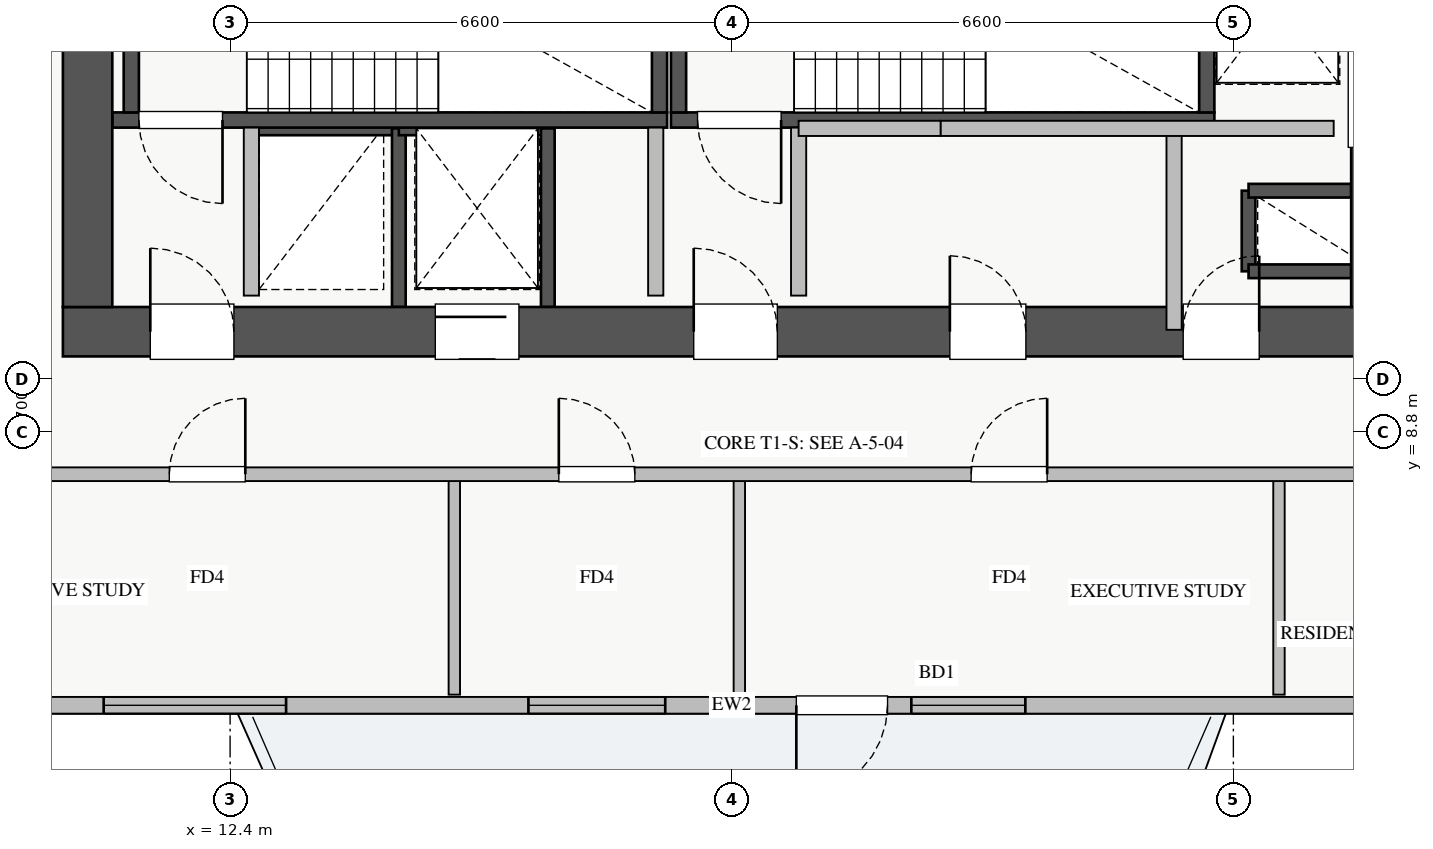
"""IFC4 building model, lengths in metres.
Left out: names, types, materials, properties, quantities, classifications, styles, units other than length and angle.
Written with IfcOpenShell. Run it as: python <this file> out.ifc"""

import sys

from ifc_helpers import new_model, si_unit, direction, frame, frame_2d, origin, place, context, subcontext, project, spatial, rectangle, extrude, source, transform, mapped, element, fill, save


model = new_model("IFC4")
c1 = context("Model", 3, precision=1e-05, world=origin(), true_north=direction((0.0, 1.0)))
c2 = subcontext(c1, "Body", "Model", "MODEL_VIEW")
j1 = project(units=[si_unit("LENGTHUNIT", "METRE"), si_unit("PLANEANGLEUNIT", "RADIAN")], contexts=[c1])
p1 = place(None, origin())
s1 = spatial("IfcSite", under=j1, at=p1, CompositionType="ELEMENT")
p2 = place(p1, origin())
s2 = spatial("IfcBuilding", under=s1, at=p2, CompositionType="ELEMENT")
p3 = place(p2, frame((0.0, 0.0, 116.5)))
s3 = spatial("IfcBuildingStorey", under=s2, at=p3, CompositionType="ELEMENT", Elevation=116.5)
p4 = place(p3, frame((12.68, 12.8, 0.0), z_axis=(0.0, 0.0, 1.0), x_axis=(1.0, 0.0, 0.0)))
e1 = element("IfcWall", 1, at=p4, inside=s3, PredefinedType="SHEAR", context=c2, shape_type="SweptSolid", body=[
    extrude(rectangle(XDim=1.94, YDim=0.18, at=frame_2d((0.97, 0.0))), origin(), (0.0, 0.0, 1.0), 3.07),
])
p5 = place(p3, frame((14.62, 10.45, 0.0), z_axis=(0.0, 0.0, 1.0), x_axis=(0.0, 1.0, 0.0)))
e2 = element("IfcWall", 2, at=p5, inside=s3, PredefinedType="SHEAR", context=c2, shape_type="SweptSolid", body=[
    extrude(rectangle(XDim=2.35, YDim=0.18, at=frame_2d((1.175, 0.0))), origin(), (0.0, 0.0, 1.0), 3.07),
])
p6 = place(p3, frame((25.8, 10.92, 0.0), z_axis=(0.0, 0.0, 1.0), x_axis=(0.0, 1.0, 0.0)))
e3 = element("IfcWall", 3, at=p6, inside=s3, PredefinedType="SHEAR", context=c2, shape_type="SweptSolid", body=[
    extrude(rectangle(XDim=1.06, YDim=0.18, at=frame_2d((0.53, 0.0))), origin(), (0.0, 0.0, 1.0), 3.07),
])
for number, where, z_axis, x_axis in (
    (4, (25.8, 11.98, 0.0), (0.0, 0.0, 1.0), (1.0, 0.0, 0.0)),
    (5, (25.8, 10.92, 0.0), (0.0, 0.0, 1.0), (1.0, 0.0, 0.0)),
):
    element("IfcWall", number, at=place(p3, frame(where, z_axis=z_axis, x_axis=x_axis)), inside=s3, PredefinedType="SHEAR", context=c2, shape_type="SweptSolid", body=[
        extrude(rectangle(XDim=1.35, YDim=0.18, at=frame_2d((0.675, 0.0))), origin(), (0.0, 0.0, 1.0), 3.07),
    ])
p7 = place(p3, frame((14.62, 12.8, 0.0), z_axis=(0.0, 0.0, 1.0), x_axis=(1.0, 0.0, 0.0)))
e6 = element("IfcWall", 6, at=p7, inside=s3, PredefinedType="SHEAR", context=c2, shape_type="SweptSolid", body=[
    extrude(rectangle(XDim=1.96, YDim=0.18, at=frame_2d((0.98, 0.0))), origin(), (0.0, 0.0, 1.0), 3.07),
])
p8 = place(p3, frame((16.58, 10.45, 0.0), z_axis=(0.0, 0.0, 1.0), x_axis=(0.0, 1.0, 0.0)))
e7 = element("IfcWall", 7, at=p8, inside=s3, PredefinedType="SHEAR", context=c2, shape_type="SweptSolid", body=[
    extrude(rectangle(XDim=2.35, YDim=0.18, at=frame_2d((1.175, 0.0))), origin(), (0.0, 0.0, 1.0), 3.07),
])
p9 = place(p3, frame((10.85, 12.91, 0.0), z_axis=(0.0, 0.0, 1.0), x_axis=(1.0, 0.0, 0.0)))
e8 = element("IfcWall", 8, at=p9, inside=s3, PredefinedType="SHEAR", context=c2, shape_type="SweptSolid", body=[
    extrude(rectangle(XDim=7.3, YDim=0.2, at=frame_2d((3.65, 0.0))), origin(), (0.0, 0.0, 1.0), 3.25),
])
p10 = place(p9, frame((0.35, 0.0, 0.0)))
e9 = element("IfcOpeningElement", 9, at=p10, cuts=e8, PredefinedType="OPENING", context=c2, shape_type="SweptSolid", body=[
    extrude(rectangle(XDim=1.1, YDim=2.05, at=frame_2d((0.55, 1.025))), frame((0.0, 0.11, 0.0), z_axis=(0.0, -1.0, 0.0), x_axis=(1.0, 0.0, 0.0)), (0.0, 0.0, 1.0), 0.22),
])
for number, where, z_axis, x_axis in (
    (10, (11.1, 13.01, 0.0), (0.0, 0.0, 1.0), (0.0, 1.0, 0.0)),
    (11, (18.05, 13.01, 0.0), (0.0, 0.0, 1.0), (0.0, 1.0, 0.0)),
):
    element("IfcWall", number, at=place(p3, frame(where, z_axis=z_axis, x_axis=x_axis)), inside=s3, PredefinedType="SHEAR", context=c2, shape_type="SweptSolid", body=[
        extrude(rectangle(XDim=2.94, YDim=0.2, at=frame_2d((1.47, 0.0))), origin(), (0.0, 0.0, 1.0), 3.25),
    ])
p11 = place(p3, frame((18.2, 12.91, 0.0), z_axis=(0.0, 0.0, 1.0), x_axis=(1.0, 0.0, 0.0)))
e12 = element("IfcWall", 12, at=p11, inside=s3, PredefinedType="SHEAR", context=c2, shape_type="SweptSolid", body=[
    extrude(rectangle(XDim=7.15, YDim=0.2, at=frame_2d((3.575, 0.0))), origin(), (0.0, 0.0, 1.0), 3.25),
])
p12 = place(p11, frame((0.35, 0.0, 0.0)))
e13 = element("IfcOpeningElement", 13, at=p12, cuts=e12, PredefinedType="OPENING", context=c2, shape_type="SweptSolid", body=[
    extrude(rectangle(XDim=1.1, YDim=2.05, at=frame_2d((0.55, 1.025))), frame((0.0, 0.11, 0.0), z_axis=(0.0, -1.0, 0.0), x_axis=(1.0, 0.0, 0.0)), (0.0, 0.0, 1.0), 0.22),
])
for number, where, z_axis, x_axis in (
    (14, (18.3, 13.01, 0.0), (0.0, 0.0, 1.0), (0.0, 1.0, 0.0)),
    (15, (25.25, 13.01, 0.0), (0.0, 0.0, 1.0), (0.0, 1.0, 0.0)),
):
    element("IfcWall", number, at=place(p3, frame(where, z_axis=z_axis, x_axis=x_axis)), inside=s3, PredefinedType="SHEAR", context=c2, shape_type="SweptSolid", body=[
        extrude(rectangle(XDim=2.94, YDim=0.2, at=frame_2d((1.47, 0.0))), origin(), (0.0, 0.0, 1.0), 3.25),
    ])
p13 = place(p3, frame((10.2, 10.125, 0.0), z_axis=(0.0, 0.0, 1.0), x_axis=(1.0, 0.0, 0.0)))
e16 = element("IfcWall", 16, at=p13, inside=s3, PredefinedType="SHEAR", context=c2, shape_type="SweptSolid", body=[
    extrude(rectangle(XDim=17.6, YDim=0.65, at=frame_2d((8.8, 0.0))), origin(), (0.0, 0.0, 1.0), 3.25),
])
p14 = place(p13, frame((1.15, 0.0, 0.0)))
e17 = element("IfcOpeningElement", 17, at=p14, cuts=e16, PredefinedType="OPENING", context=c2, shape_type="SweptSolid", body=[
    extrude(rectangle(XDim=1.1, YDim=2.05, at=frame_2d((0.55, 1.025))), frame((0.0, 0.335, 0.0), z_axis=(0.0, -1.0, 0.0), x_axis=(1.0, 0.0, 0.0)), (0.0, 0.0, 1.0), 0.67),
])
p15 = place(p13, frame((8.3, 0.0, 0.0)))
e18 = element("IfcOpeningElement", 18, at=p15, cuts=e16, PredefinedType="OPENING", context=c2, shape_type="SweptSolid", body=[
    extrude(rectangle(XDim=1.1, YDim=2.05, at=frame_2d((0.55, 1.025))), frame((0.0, 0.335, 0.0), z_axis=(0.0, -1.0, 0.0), x_axis=(1.0, 0.0, 0.0)), (0.0, 0.0, 1.0), 0.67),
])
p16 = place(p13, frame((4.9, 0.0, 0.0)))
e19 = element("IfcOpeningElement", 19, at=p16, cuts=e16, PredefinedType="OPENING", context=c2, shape_type="SweptSolid", body=[
    extrude(rectangle(XDim=1.1, YDim=2.05, at=frame_2d((0.55, 1.025))), frame((0.0, 0.335, 0.0), z_axis=(0.0, -1.0, 0.0), x_axis=(1.0, 0.0, 0.0)), (0.0, 0.0, 1.0), 0.67),
])
p17 = place(p13, frame((14.74, 0.0, 0.0)))
e20 = element("IfcOpeningElement", 20, at=p17, cuts=e16, PredefinedType="OPENING", context=c2, shape_type="SweptSolid", body=[
    extrude(rectangle(XDim=1.0, YDim=2.05, at=frame_2d((0.5, 1.025))), frame((0.0, 0.335, 0.0), z_axis=(0.0, -1.0, 0.0), x_axis=(1.0, 0.0, 0.0)), (0.0, 0.0, 1.0), 0.67),
])
p18 = place(p13, frame((11.67, 0.0, 0.0)))
e21 = element("IfcOpeningElement", 21, at=p18, cuts=e16, PredefinedType="OPENING", context=c2, shape_type="SweptSolid", body=[
    extrude(rectangle(XDim=1.0, YDim=2.05, at=frame_2d((0.5, 1.025))), frame((0.0, 0.335, 0.0), z_axis=(0.0, -1.0, 0.0), x_axis=(1.0, 0.0, 0.0)), (0.0, 0.0, 1.0), 0.67),
])
p19 = place(p3, frame((10.525, 10.45, 0.0), z_axis=(0.0, 0.0, 1.0), x_axis=(0.0, 1.0, 0.0)))
e22 = element("IfcWall", 22, at=p19, inside=s3, PredefinedType="SHEAR", context=c2, shape_type="SweptSolid", body=[
    extrude(rectangle(XDim=5.9, YDim=0.65, at=frame_2d((2.95, 0.0))), origin(), (0.0, 0.0, 1.0), 3.25),
])
p20 = place(p3, frame((27.475, 10.45, 0.0), z_axis=(0.0, 0.0, 1.0), x_axis=(0.0, 1.0, 0.0)))
e23 = element("IfcWall", 23, at=p20, inside=s3, PredefinedType="SHEAR", context=c2, shape_type="SweptSolid", body=[
    extrude(rectangle(XDim=5.9, YDim=0.65, at=frame_2d((2.95, 0.0))), origin(), (0.0, 0.0, 1.0), 3.25),
])
p21 = place(p20, frame((2.1, 0.0, 0.0)))
e24 = element("IfcOpeningElement", 24, at=p21, cuts=e23, PredefinedType="OPENING", context=c2, shape_type="SweptSolid", body=[
    extrude(rectangle(XDim=1.3, YDim=2.05, at=frame_2d((0.65, 1.025))), frame((0.0, 0.335, 0.0), z_axis=(0.0, -1.0, 0.0), x_axis=(1.0, 0.0, 0.0)), (0.0, 0.0, 1.0), 0.67),
])
p22 = place(p3, frame((6.55, 5.21, 0.0), z_axis=(0.0, 0.0, 1.0), x_axis=(1.0, 0.0, 0.0)))
e25 = element("IfcWall", 25, at=p22, inside=s3, PredefinedType="STANDARD", context=c2, shape_type="SweptSolid", body=[
    extrude(rectangle(XDim=24.9, YDim=0.22, at=frame_2d((12.45, 0.0))), origin(), (0.0, 0.0, 1.0), 2.61),
])
p23 = place(p22, frame((13.3, 0.0, 0.0)))
e26 = element("IfcOpeningElement", 26, at=p23, cuts=e25, PredefinedType="OPENING", context=c2, shape_type="SweptSolid", body=[
    extrude(rectangle(XDim=1.2, YDim=2.1, at=frame_2d((0.6, 1.05))), frame((0.0, 0.12, 0.0), z_axis=(0.0, -1.0, 0.0), x_axis=(1.0, 0.0, 0.0)), (0.0, 0.0, 1.0), 0.24),
])
p24 = place(p22, frame((0.258, 0.0, 0.9)))
e27 = element("IfcOpeningElement", 27, at=p24, cuts=e25, PredefinedType="OPENING", context=c2, shape_type="SweptSolid", body=[
    extrude(rectangle(XDim=1.8, YDim=1.5, at=frame_2d((0.9, 0.75))), frame((0.0, 0.12, 0.0), z_axis=(0.0, -1.0, 0.0), x_axis=(1.0, 0.0, 0.0)), (0.0, 0.0, 1.0), 0.24),
])
p25 = place(p22, frame((9.775, 0.0, 0.9)))
e28 = element("IfcOpeningElement", 28, at=p25, cuts=e25, PredefinedType="OPENING", context=c2, shape_type="SweptSolid", body=[
    extrude(rectangle(XDim=1.8, YDim=1.5, at=frame_2d((0.9, 0.75))), frame((0.0, 0.12, 0.0), z_axis=(0.0, -1.0, 0.0), x_axis=(1.0, 0.0, 0.0)), (0.0, 0.0, 1.0), 0.24),
])
p26 = place(p22, frame((14.813, 0.0, 0.9)))
e29 = element("IfcOpeningElement", 29, at=p26, cuts=e25, PredefinedType="OPENING", context=c2, shape_type="SweptSolid", body=[
    extrude(rectangle(XDim=1.5, YDim=1.45, at=frame_2d((0.75, 0.725))), frame((0.0, 0.12, 0.0), z_axis=(0.0, -1.0, 0.0), x_axis=(1.0, 0.0, 0.0)), (0.0, 0.0, 1.0), 0.24),
])
p27 = place(p22, frame((20.738, 0.0, 0.9)))
e30 = element("IfcOpeningElement", 30, at=p27, cuts=e25, PredefinedType="OPENING", context=c2, shape_type="SweptSolid", body=[
    extrude(rectangle(XDim=2.1, YDim=1.48, at=frame_2d((1.05, 0.74))), frame((0.0, 0.12, 0.0), z_axis=(0.0, -1.0, 0.0), x_axis=(1.0, 0.0, 0.0)), (0.0, 0.0, 1.0), 0.24),
])
p28 = place(p22, frame((4.187, 0.0, 0.9)))
e31 = element("IfcOpeningElement", 31, at=p28, cuts=e25, PredefinedType="OPENING", context=c2, shape_type="SweptSolid", body=[
    extrude(rectangle(XDim=2.4, YDim=1.5, at=frame_2d((1.2, 0.75))), frame((0.0, 0.12, 0.0), z_axis=(0.0, -1.0, 0.0), x_axis=(1.0, 0.0, 0.0)), (0.0, 0.0, 1.0), 0.24),
])
for number, where, z_axis, x_axis in (
    (32, (12.68, 10.6, 0.0), (0.0, 0.0, 1.0), (0.0, 1.0, 0.0)),
    (33, (18.0, 10.6, 0.0), (0.0, 0.0, 1.0), (0.0, 1.0, 0.0)),
    (34, (19.88, 10.6, 0.0), (0.0, 0.0, 1.0), (0.0, 1.0, 0.0)),
):
    element("IfcWall", number, at=place(p3, frame(where, z_axis=z_axis, x_axis=x_axis)), inside=s3, PredefinedType="PARTITIONING", context=c2, shape_type="SweptSolid", body=[
        extrude(rectangle(XDim=2.21, YDim=0.2, at=frame_2d((1.105, 0.0))), origin(), (0.0, 0.0, 1.0), 3.07),
    ])
p29 = place(p3, frame((24.82, 10.15, 0.0), z_axis=(0.0, 0.0, 1.0), x_axis=(0.0, 1.0, 0.0)))
e35 = element("IfcWall", 35, at=p29, inside=s3, PredefinedType="PARTITIONING", context=c2, shape_type="SweptSolid", body=[
    extrude(rectangle(XDim=2.65, YDim=0.2, at=frame_2d((1.325, 0.0))), origin(), (0.0, 0.0, 1.0), 3.07),
])
p30 = place(p3, frame((19.88, 12.8, 0.0), z_axis=(0.0, 0.0, 1.0), x_axis=(1.0, 0.0, 0.0)))
e36 = element("IfcWall", 36, at=p30, inside=s3, PredefinedType="PARTITIONING", context=c2, shape_type="SweptSolid", body=[
    extrude(rectangle(XDim=1.87, YDim=0.2, at=frame_2d((0.935, 0.0))), origin(), (0.0, 0.0, 1.0), 3.07),
])
p31 = place(p3, frame((21.75, 12.8, 0.0), z_axis=(0.0, 0.0, 1.0), x_axis=(1.0, 0.0, 0.0)))
e37 = element("IfcWall", 37, at=p31, inside=s3, PredefinedType="PARTITIONING", context=c2, shape_type="SweptSolid", body=[
    extrude(rectangle(XDim=5.17, YDim=0.2, at=frame_2d((2.585, 0.0))), origin(), (0.0, 0.0, 1.0), 3.07),
])
p32 = place(p3, frame((15.35, 5.35, 0.0), z_axis=(0.0, 0.0, 1.0), x_axis=(0.0, 1.0, 0.0)))
e38 = element("IfcWall", 38, at=p32, inside=s3, PredefinedType="PARTITIONING", context=c2, shape_type="SweptSolid", body=[
    extrude(rectangle(XDim=2.9, YDim=0.15, at=frame_2d((1.45, 0.0))), origin(), (0.0, 0.0, 1.0), 3.07),
])
p33 = place(p3, frame((19.1, 5.35, 0.0), z_axis=(0.0, 0.0, 1.0), x_axis=(0.0, 1.0, 0.0)))
e39 = element("IfcWall", 39, at=p33, inside=s3, PredefinedType="PARTITIONING", context=c2, shape_type="SweptSolid", body=[
    extrude(rectangle(XDim=2.9, YDim=0.15, at=frame_2d((1.45, 0.0))), origin(), (0.0, 0.0, 1.0), 2.815),
])
p34 = place(p3, frame((26.2, 5.35, 0.0), z_axis=(0.0, 0.0, 1.0), x_axis=(0.0, 1.0, 0.0)))
e40 = element("IfcWall", 40, at=p34, inside=s3, PredefinedType="PARTITIONING", context=c2, shape_type="SweptSolid", body=[
    extrude(rectangle(XDim=2.9, YDim=0.15, at=frame_2d((1.45, 0.0))), origin(), (0.0, 0.0, 1.0), 3.07),
])
p35 = place(p3, frame((8.85, 8.25, 0.0), z_axis=(0.0, 0.0, 1.0), x_axis=(1.0, 0.0, 0.0)))
e41 = element("IfcWall", 41, at=p35, inside=s3, PredefinedType="PARTITIONING", context=c2, shape_type="SweptSolid", body=[
    extrude(rectangle(XDim=23.57, YDim=0.18, at=frame_2d((11.785, 0.0))), origin(), (0.0, 0.0, 1.0), 3.07),
])
p36 = place(p35, frame((2.75, 0.0, 0.0)))
e42 = element("IfcOpeningElement", 42, at=p36, cuts=e41, PredefinedType="OPENING", context=c2, shape_type="SweptSolid", body=[
    extrude(rectangle(XDim=1.0, YDim=2.05, at=frame_2d((0.5, 1.025))), frame((0.0, 0.1, 0.0), z_axis=(0.0, -1.0, 0.0), x_axis=(1.0, 0.0, 0.0)), (0.0, 0.0, 1.0), 0.2),
])
p37 = place(p35, frame((7.875, 0.0, 0.0)))
e43 = element("IfcOpeningElement", 43, at=p37, cuts=e41, PredefinedType="OPENING", context=c2, shape_type="SweptSolid", body=[
    extrude(rectangle(XDim=1.0, YDim=2.05, at=frame_2d((0.5, 1.025))), frame((0.0, 0.1, 0.0), z_axis=(0.0, -1.0, 0.0), x_axis=(1.0, 0.0, 0.0)), (0.0, 0.0, 1.0), 0.2),
])
p38 = place(p35, frame((13.3, 0.0, 0.0)))
e44 = element("IfcOpeningElement", 44, at=p38, cuts=e41, PredefinedType="OPENING", context=c2, shape_type="SweptSolid", body=[
    extrude(rectangle(XDim=1.0, YDim=2.05, at=frame_2d((0.5, 1.025))), frame((0.0, 0.1, 0.0), z_axis=(0.0, -1.0, 0.0), x_axis=(1.0, 0.0, 0.0)), (0.0, 0.0, 1.0), 0.2),
])
p39 = place(p35, frame((19.74, 0.0, 0.0)))
e45 = element("IfcOpeningElement", 45, at=p39, cuts=e41, PredefinedType="OPENING", context=c2, shape_type="SweptSolid", body=[
    extrude(rectangle(XDim=1.0, YDim=2.05, at=frame_2d((0.5, 1.025))), frame((0.0, 0.1, 0.0), z_axis=(0.0, -1.0, 0.0), x_axis=(1.0, 0.0, 0.0)), (0.0, 0.0, 1.0), 0.2),
])
m1 = source(origin(), c2, "Body", "SweptSolid", [
    extrude(rectangle(XDim=1.2, YDim=2.1, at=frame_2d((0.6, 1.05))), frame((0.0, 0.025, 0.0), z_axis=(0.0, -1.0, 0.0), x_axis=(1.0, 0.0, 0.0)), (0.0, 0.0, 1.0), 0.05),
])
p40 = place(p23, frame((1.2, 0.0, 0.0), z_axis=(0.0, 0.0, 1.0), x_axis=(-1.0, 0.0, 0.0)))
e46 = element("IfcDoor", 46, at=p40, inside=s3, OperationType="SINGLE_SWING_LEFT", PredefinedType="DOOR", context=c2, shape_type="MappedRepresentation", body=[
    mapped(m1, transform((0.0, 0.0, 0.0), x_axis=(1.0, 0.0, 0.0), y_axis=(0.0, 1.0, 0.0), z_axis=(0.0, 0.0, 1.0), scale=1.0)),
])
fill(e26, e46)
m2 = source(origin(), c2, "Body", "SweptSolid", [
    extrude(rectangle(XDim=1.8, YDim=1.5, at=frame_2d((0.9, 0.75))), frame((0.0, 0.03, 0.0), z_axis=(0.0, -1.0, 0.0), x_axis=(1.0, 0.0, 0.0)), (0.0, 0.0, 1.0), 0.06),
])
p41 = place(p25, origin())
e47 = element("IfcWindow", 47, at=p41, inside=s3, PartitioningType="DOUBLE_PANEL_VERTICAL", PredefinedType="WINDOW", context=c2, shape_type="MappedRepresentation", body=[
    mapped(m2, transform((0.0, 0.0, 0.0), x_axis=(1.0, 0.0, 0.0), y_axis=(0.0, 1.0, 0.0), z_axis=(0.0, 0.0, 1.0), scale=1.0)),
])
fill(e28, e47)
m3 = source(origin(), c2, "Body", "SweptSolid", [
    extrude(rectangle(XDim=1.5, YDim=1.45, at=frame_2d((0.75, 0.725))), frame((0.0, 0.03, 0.0), z_axis=(0.0, -1.0, 0.0), x_axis=(1.0, 0.0, 0.0)), (0.0, 0.0, 1.0), 0.06),
])
p42 = place(p26, origin())
e48 = element("IfcWindow", 48, at=p42, inside=s3, PartitioningType="DOUBLE_PANEL_VERTICAL", PredefinedType="WINDOW", context=c2, shape_type="MappedRepresentation", body=[
    mapped(m3, transform((0.0, 0.0, 0.0), x_axis=(1.0, 0.0, 0.0), y_axis=(0.0, 1.0, 0.0), z_axis=(0.0, 0.0, 1.0), scale=1.0)),
])
fill(e29, e48)
m4 = source(origin(), c2, "Body", "SweptSolid", [
    extrude(rectangle(XDim=1.1, YDim=2.05, at=frame_2d((0.55, 1.025))), frame((0.0, 0.025, 0.0), z_axis=(0.0, -1.0, 0.0), x_axis=(1.0, 0.0, 0.0)), (0.0, 0.0, 1.0), 0.05),
])
p43 = place(p14, origin())
e49 = element("IfcDoor", 49, at=p43, inside=s3, OperationType="SINGLE_SWING_LEFT", PredefinedType="DOOR", context=c2, shape_type="MappedRepresentation", body=[
    mapped(m4, transform((0.0, 0.0, 0.0), x_axis=(1.0, 0.0, 0.0), y_axis=(0.0, 1.0, 0.0), z_axis=(0.0, 0.0, 1.0), scale=1.0)),
])
fill(e17, e49)
p44 = place(p10, frame((1.1, 0.0, 0.0), z_axis=(0.0, 0.0, 1.0), x_axis=(-1.0, 0.0, 0.0)))
e50 = element("IfcDoor", 50, at=p44, inside=s3, OperationType="SINGLE_SWING_RIGHT", PredefinedType="DOOR", context=c2, shape_type="MappedRepresentation", body=[
    mapped(m4, transform((0.0, 0.0, 0.0), x_axis=(1.0, 0.0, 0.0), y_axis=(0.0, 1.0, 0.0), z_axis=(0.0, 0.0, 1.0), scale=1.0)),
])
fill(e9, e50)
p45 = place(p15, origin())
e51 = element("IfcDoor", 51, at=p45, inside=s3, OperationType="SINGLE_SWING_LEFT", PredefinedType="DOOR", context=c2, shape_type="MappedRepresentation", body=[
    mapped(m4, transform((0.0, 0.0, 0.0), x_axis=(1.0, 0.0, 0.0), y_axis=(0.0, 1.0, 0.0), z_axis=(0.0, 0.0, 1.0), scale=1.0)),
])
fill(e18, e51)
p46 = place(p12, frame((1.1, 0.0, 0.0), z_axis=(0.0, 0.0, 1.0), x_axis=(-1.0, 0.0, 0.0)))
e52 = element("IfcDoor", 52, at=p46, inside=s3, OperationType="SINGLE_SWING_RIGHT", PredefinedType="DOOR", context=c2, shape_type="MappedRepresentation", body=[
    mapped(m4, transform((0.0, 0.0, 0.0), x_axis=(1.0, 0.0, 0.0), y_axis=(0.0, 1.0, 0.0), z_axis=(0.0, 0.0, 1.0), scale=1.0)),
])
fill(e13, e52)
p47 = place(p16, origin())
e53 = element("IfcDoor", 53, at=p47, inside=s3, OperationType="SLIDING_TO_RIGHT", PredefinedType="DOOR", context=c2, shape_type="MappedRepresentation", body=[
    mapped(m4, transform((0.0, 0.0, 0.0), x_axis=(1.0, 0.0, 0.0), y_axis=(0.0, 1.0, 0.0), z_axis=(0.0, 0.0, 1.0), scale=1.0)),
])
fill(e19, e53)
m5 = source(origin(), c2, "Body", "SweptSolid", [
    extrude(rectangle(XDim=1.0, YDim=2.05, at=frame_2d((0.5, 1.025))), frame((0.0, 0.025, 0.0), z_axis=(0.0, -1.0, 0.0), x_axis=(1.0, 0.0, 0.0)), (0.0, 0.0, 1.0), 0.05),
])
p48 = place(p17, origin())
e54 = element("IfcDoor", 54, at=p48, inside=s3, OperationType="SINGLE_SWING_RIGHT", PredefinedType="DOOR", context=c2, shape_type="MappedRepresentation", body=[
    mapped(m5, transform((0.0, 0.0, 0.0), x_axis=(1.0, 0.0, 0.0), y_axis=(0.0, 1.0, 0.0), z_axis=(0.0, 0.0, 1.0), scale=1.0)),
])
fill(e20, e54)
p49 = place(p18, origin())
e55 = element("IfcDoor", 55, at=p49, inside=s3, OperationType="SINGLE_SWING_LEFT", PredefinedType="DOOR", context=c2, shape_type="MappedRepresentation", body=[
    mapped(m5, transform((0.0, 0.0, 0.0), x_axis=(1.0, 0.0, 0.0), y_axis=(0.0, 1.0, 0.0), z_axis=(0.0, 0.0, 1.0), scale=1.0)),
])
fill(e21, e55)
p50 = place(p36, origin())
e56 = element("IfcDoor", 56, at=p50, inside=s3, OperationType="SINGLE_SWING_RIGHT", PredefinedType="DOOR", context=c2, shape_type="MappedRepresentation", body=[
    mapped(m5, transform((0.0, 0.0, 0.0), x_axis=(1.0, 0.0, 0.0), y_axis=(0.0, 1.0, 0.0), z_axis=(0.0, 0.0, 1.0), scale=1.0)),
])
fill(e42, e56)
p51 = place(p37, origin())
e57 = element("IfcDoor", 57, at=p51, inside=s3, OperationType="SINGLE_SWING_LEFT", PredefinedType="DOOR", context=c2, shape_type="MappedRepresentation", body=[
    mapped(m5, transform((0.0, 0.0, 0.0), x_axis=(1.0, 0.0, 0.0), y_axis=(0.0, 1.0, 0.0), z_axis=(0.0, 0.0, 1.0), scale=1.0)),
])
fill(e43, e57)
p52 = place(p38, origin())
e58 = element("IfcDoor", 58, at=p52, inside=s3, OperationType="SINGLE_SWING_RIGHT", PredefinedType="DOOR", context=c2, shape_type="MappedRepresentation", body=[
    mapped(m5, transform((0.0, 0.0, 0.0), x_axis=(1.0, 0.0, 0.0), y_axis=(0.0, 1.0, 0.0), z_axis=(0.0, 0.0, 1.0), scale=1.0)),
])
fill(e44, e58)
m6 = source(origin(), c2, "Body", "SweptSolid", [
    extrude(rectangle(XDim=2.4, YDim=1.5, at=frame_2d((1.2, 0.75))), frame((0.0, 0.03, 0.0), z_axis=(0.0, -1.0, 0.0), x_axis=(1.0, 0.0, 0.0)), (0.0, 0.0, 1.0), 0.06),
])
p53 = place(p28, origin())
e59 = element("IfcWindow", 59, at=p53, inside=s3, PartitioningType="TRIPLE_PANEL_VERTICAL", PredefinedType="WINDOW", context=c2, shape_type="MappedRepresentation", body=[
    mapped(m6, transform((0.0, 0.0, 0.0), x_axis=(1.0, 0.0, 0.0), y_axis=(0.0, 1.0, 0.0), z_axis=(0.0, 0.0, 1.0), scale=1.0)),
])
fill(e31, e59)
save(model, sys.argv[1])
